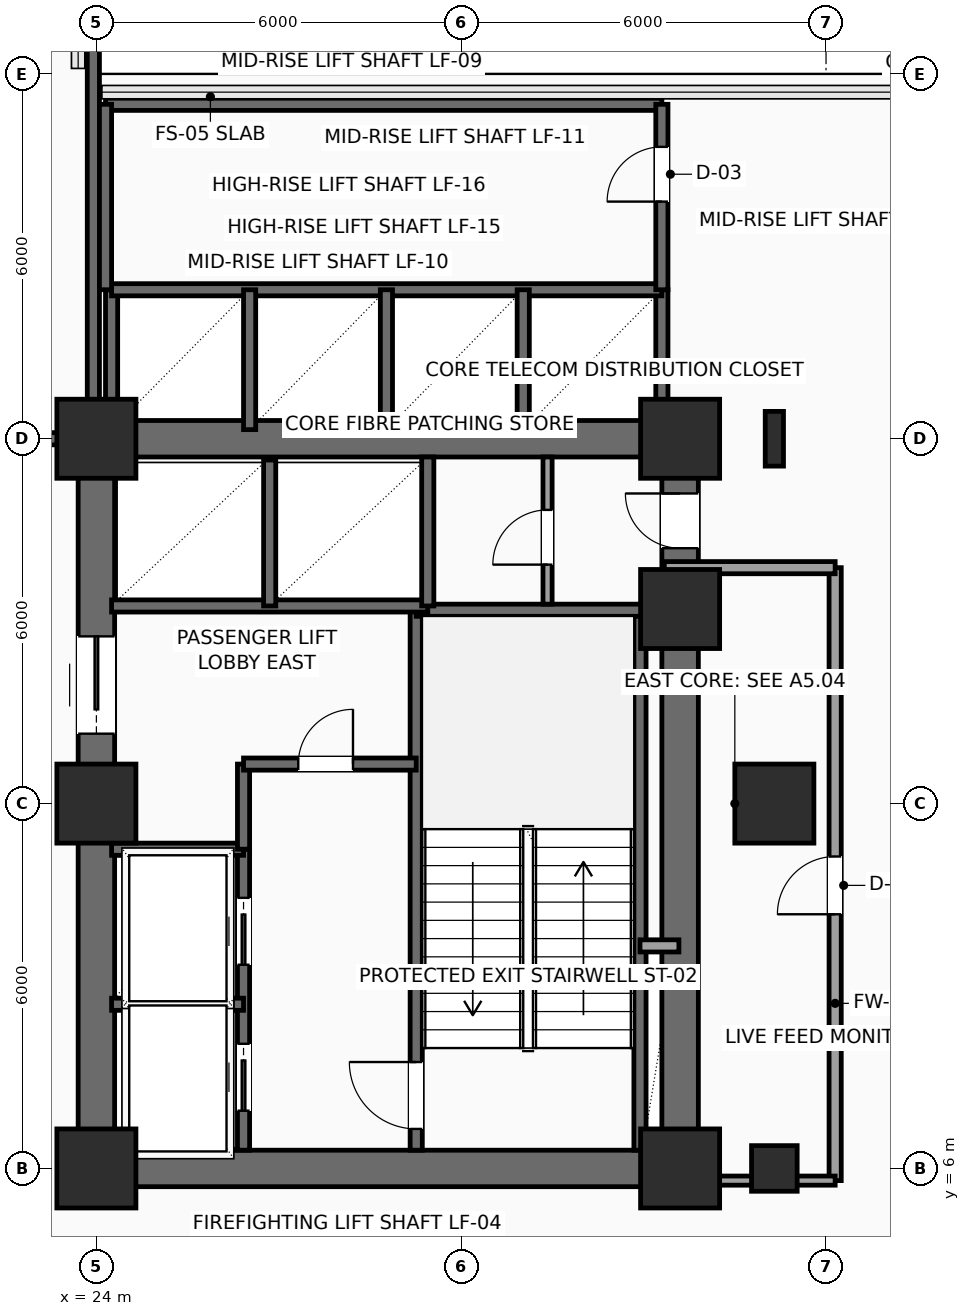
"""IFC4 building model, lengths in metres.
Left out: names, types, materials, properties, quantities, classifications, styles, units other than length and angle.
Written with IfcOpenShell. Run it as: python <this file> out.ifc"""

import sys

from ifc_helpers import new_model, si_unit, direction, frame, frame_2d, origin, origin_2d, place, context, subcontext, project, spatial, rectangle, hollow_rectangle, i_section, extrude, element, fill, save


model = new_model("IFC4")
c1 = context("Model", 3, precision=1e-05, world=origin(), true_north=direction((0.0, 1.0)))
c2 = subcontext(c1, "Body", "Model", "MODEL_VIEW")
j1 = project(units=[si_unit("LENGTHUNIT", "METRE"), si_unit("PLANEANGLEUNIT", "RADIAN")], contexts=[c1])
p1 = place(None, origin())
s1 = spatial("IfcSite", under=j1, at=p1, CompositionType="ELEMENT")
p2 = place(p1, origin())
s2 = spatial("IfcBuilding", under=s1, at=p2, CompositionType="ELEMENT")
p3 = place(p2, frame((0.0, 0.0, 59.7)))
s3 = spatial("IfcBuildingStorey", under=s2, at=p3, CompositionType="ELEMENT", Elevation=59.7)
for number, where, z_axis, x_axis in (
    (1, (24.0, 6.0, 0.0), (0.0, 0.0, 1.0), (1.0, 0.0, 0.0)),
    (2, (24.0, 12.0, 0.0), (0.0, 0.0, 1.0), (1.0, 0.0, 0.0)),
    (3, (24.0, 18.0, 0.0), (0.0, 0.0, 1.0), (1.0, 0.0, 0.0)),
    (4, (33.6, 6.0, 0.0), (0.0, 0.0, 1.0), (1.0, 0.0, 0.0)),
    (5, (33.6, 15.2, 0.0), (0.0, 0.0, 1.0), (1.0, 0.0, 0.0)),
    (6, (33.6, 18.0, 0.0), (0.0, 0.0, 1.0), (1.0, 0.0, 0.0)),
):
    element("IfcColumn", number, at=place(p3, frame(where, z_axis=z_axis, x_axis=x_axis)), inside=s3, PredefinedType="COLUMN", context=c2, shape_type="SweptSolid", body=[
        extrude(rectangle(XDim=1.3, YDim=1.3, at=origin_2d()), origin(), (0.0, 0.0, 1.0), 3.9),
    ])
p4 = place(p3, frame((35.15, 6.0, 0.0), z_axis=(0.0, 0.0, 1.0), x_axis=(1.0, 0.0, 0.0)))
e7 = element("IfcColumn", 7, at=p4, inside=s3, PredefinedType="COLUMN", context=c2, shape_type="SweptSolid", body=[
    extrude(hollow_rectangle(XDim=0.75, YDim=0.75, WallThickness=0.035, InnerFilletRadius=0.035, OuterFilletRadius=0.05, at=origin_2d()), origin(), (0.0, 0.0, 1.0), 3.9),
])
p5 = place(p3, frame((35.15, 12.0, 0.0), z_axis=(0.0, 0.0, 1.0), x_axis=(1.0, 0.0, 0.0)))
e8 = element("IfcColumn", 8, at=p5, inside=s3, PredefinedType="COLUMN", context=c2, shape_type="SweptSolid", body=[
    extrude(rectangle(XDim=1.3, YDim=1.3, at=origin_2d()), origin(), (0.0, 0.0, 1.0), 3.9),
])
p6 = place(p3, frame((35.15, 18.0, 0.0), z_axis=(0.0, 0.0, 1.0), x_axis=(1.0, 0.0, 0.0)))
e9 = element("IfcColumn", 9, at=p6, inside=s3, PredefinedType="COLUMN", context=c2, shape_type="SweptSolid", body=[
    extrude(i_section(OverallWidth=0.3, OverallDepth=0.9, WebThickness=0.019, FlangeThickness=0.035, FilletRadius=0.03, at=origin_2d()), origin(), (0.0, 0.0, 1.0), 3.9),
])
for number, where, z_axis, x_axis in (
    (10, (24.0, 6.0, 0.0), (0.0, 0.0, 1.0), (1.0, 0.0, 0.0)),
    (11, (24.0, 18.0, 0.0), (0.0, 0.0, 1.0), (1.0, 0.0, 0.0)),
):
    element("IfcWall", number, at=place(p3, frame(where, z_axis=z_axis, x_axis=x_axis)), inside=s3, PredefinedType="SHEAR", context=c2, shape_type="SweptSolid", body=[
        extrude(rectangle(XDim=9.6, YDim=0.6, at=frame_2d((4.8, 0.0))), origin(), (0.0, 0.0, 1.0), 3.65),
    ])
p7 = place(p3, frame((24.0, 6.0, 0.0), z_axis=(0.0, 0.0, 1.0), x_axis=(0.0, 1.0, 0.0)))
e12 = element("IfcWall", 12, at=p7, inside=s3, PredefinedType="SHEAR", context=c2, shape_type="SweptSolid", body=[
    extrude(rectangle(XDim=12.0, YDim=0.6, at=frame_2d((6.0, 0.0))), origin(), (0.0, 0.0, 1.0), 3.65),
])
p8 = place(p7, frame((7.15, 0.0, 0.0)))
e13 = element("IfcOpeningElement", 13, at=p8, cuts=e12, PredefinedType="OPENING", context=c2, shape_type="SweptSolid", body=[
    extrude(rectangle(XDim=1.6, YDim=2.3, at=frame_2d((0.8, 1.15))), frame((0.0, 0.31, 0.0), z_axis=(0.0, -1.0, 0.0), x_axis=(1.0, 0.0, 0.0)), (0.0, 0.0, 1.0), 0.62),
])
p9 = place(p3, frame((33.6, 6.0, 0.0), z_axis=(0.0, 0.0, 1.0), x_axis=(0.0, 1.0, 0.0)))
e14 = element("IfcWall", 14, at=p9, inside=s3, PredefinedType="SHEAR", context=c2, shape_type="SweptSolid", body=[
    extrude(rectangle(XDim=12.0, YDim=0.6, at=frame_2d((6.0, 0.0))), origin(), (0.0, 0.0, 1.0), 3.65),
])
p10 = place(p9, frame((10.2, 0.0, 0.0)))
e15 = element("IfcOpeningElement", 15, at=p10, cuts=e14, PredefinedType="OPENING", context=c2, shape_type="SweptSolid", body=[
    extrude(rectangle(XDim=0.9, YDim=2.15, at=frame_2d((0.45, 1.075))), frame((0.0, 0.31, 0.0), z_axis=(0.0, -1.0, 0.0), x_axis=(1.0, 0.0, 0.0)), (0.0, 0.0, 1.0), 0.62),
])
p11 = place(p3, frame((29.26, 6.3, 0.0), z_axis=(0.0, 0.0, 1.0), x_axis=(0.0, 1.0, 0.0)))
e16 = element("IfcWall", 16, at=p11, inside=s3, PredefinedType="SHEAR", context=c2, shape_type="SweptSolid", body=[
    extrude(rectangle(XDim=8.88, YDim=0.2, at=frame_2d((4.44, 0.0))), origin(), (0.0, 0.0, 1.0), 3.65),
])
p12 = place(p11, frame((0.35, 0.0, 0.0)))
e17 = element("IfcOpeningElement", 17, at=p12, cuts=e16, PredefinedType="OPENING", context=c2, shape_type="SweptSolid", body=[
    extrude(rectangle(XDim=1.1, YDim=2.2, at=frame_2d((0.55, 1.1))), frame((0.0, 0.11, 0.0), z_axis=(0.0, -1.0, 0.0), x_axis=(1.0, 0.0, 0.0)), (0.0, 0.0, 1.0), 0.22),
])
p13 = place(p3, frame((32.94, 6.3, 0.0), z_axis=(0.0, 0.0, 1.0), x_axis=(0.0, 1.0, 0.0)))
e18 = element("IfcWall", 18, at=p13, inside=s3, PredefinedType="SHEAR", context=c2, shape_type="SweptSolid", body=[
    extrude(rectangle(XDim=8.88, YDim=0.2, at=frame_2d((4.44, 0.0))), origin(), (0.0, 0.0, 1.0), 3.65),
])
p14 = place(p3, frame((29.26, 15.18, 0.0), z_axis=(0.0, 0.0, 1.0), x_axis=(1.0, 0.0, 0.0)))
e19 = element("IfcWall", 19, at=p14, inside=s3, PredefinedType="SHEAR", context=c2, shape_type="SweptSolid", body=[
    extrude(rectangle(XDim=4.04, YDim=0.2, at=frame_2d((2.02, 0.0))), origin(), (0.0, 0.0, 1.0), 3.65),
])
p15 = place(p3, frame((26.42, 6.3, 0.0), z_axis=(0.0, 0.0, 1.0), x_axis=(0.0, 1.0, 0.0)))
e20 = element("IfcWall", 20, at=p15, inside=s3, PredefinedType="SHEAR", context=c2, shape_type="SweptSolid", body=[
    extrude(rectangle(XDim=4.95, YDim=0.2, at=frame_2d((2.475, 0.0))), origin(), (0.0, 0.0, 1.0), 3.65),
])
p16 = place(p15, frame((0.65, 0.0, 0.0)))
e21 = element("IfcOpeningElement", 21, at=p16, cuts=e20, PredefinedType="OPENING", context=c2, shape_type="SweptSolid", body=[
    extrude(rectangle(XDim=1.1, YDim=2.2, at=frame_2d((0.55, 1.1))), frame((0.0, 0.11, 0.0), z_axis=(0.0, -1.0, 0.0), x_axis=(1.0, 0.0, 0.0)), (0.0, 0.0, 1.0), 0.22),
])
p17 = place(p15, frame((3.05, 0.0, 0.0)))
e22 = element("IfcOpeningElement", 22, at=p17, cuts=e20, PredefinedType="OPENING", context=c2, shape_type="SweptSolid", body=[
    extrude(rectangle(XDim=1.1, YDim=2.2, at=frame_2d((0.55, 1.1))), frame((0.0, 0.11, 0.0), z_axis=(0.0, -1.0, 0.0), x_axis=(1.0, 0.0, 0.0)), (0.0, 0.0, 1.0), 0.22),
])
for number, where, z_axis, x_axis in (
    (23, (24.25, 8.7, 0.0), (0.0, 0.0, 1.0), (1.0, 0.0, 0.0)),
    (24, (24.25, 11.25, 0.0), (0.0, 0.0, 1.0), (1.0, 0.0, 0.0)),
):
    element("IfcWall", number, at=place(p3, frame(where, z_axis=z_axis, x_axis=x_axis)), inside=s3, PredefinedType="SHEAR", context=c2, shape_type="SweptSolid", body=[
        extrude(rectangle(XDim=2.17, YDim=0.2, at=frame_2d((1.085, 0.0))), origin(), (0.0, 0.0, 1.0), 3.65),
    ])
p18 = place(p3, frame((26.42, 11.25, 0.0), z_axis=(0.0, 0.0, 1.0), x_axis=(0.0, 1.0, 0.0)))
e25 = element("IfcWall", 25, at=p18, inside=s3, PredefinedType="SHEAR", context=c2, shape_type="SweptSolid", body=[
    extrude(rectangle(XDim=1.4, YDim=0.2, at=frame_2d((0.7, 0.0))), origin(), (0.0, 0.0, 1.0), 3.65),
])
p19 = place(p3, frame((26.42, 12.65, 0.0), z_axis=(0.0, 0.0, 1.0), x_axis=(1.0, 0.0, 0.0)))
e26 = element("IfcWall", 26, at=p19, inside=s3, PredefinedType="SHEAR", context=c2, shape_type="SweptSolid", body=[
    extrude(rectangle(XDim=2.84, YDim=0.2, at=frame_2d((1.42, 0.0))), origin(), (0.0, 0.0, 1.0), 3.65),
])
p20 = place(p19, frame((0.9, 0.0, 0.0)))
e27 = element("IfcOpeningElement", 27, at=p20, cuts=e26, PredefinedType="OPENING", context=c2, shape_type="SweptSolid", body=[
    extrude(rectangle(XDim=0.9, YDim=2.15, at=frame_2d((0.45, 1.075))), frame((0.0, 0.11, 0.0), z_axis=(0.0, -1.0, 0.0), x_axis=(1.0, 0.0, 0.0)), (0.0, 0.0, 1.0), 0.22),
])
p21 = place(p3, frame((32.94, 9.66, 0.0), z_axis=(0.0, 0.0, 1.0), x_axis=(1.0, 0.0, 0.0)))
e28 = element("IfcWall", 28, at=p21, inside=s3, PredefinedType="SOLIDWALL", context=c2, shape_type="SweptSolid", body=[
    extrude(rectangle(XDim=0.64, YDim=0.2, at=frame_2d((0.32, 0.0))), origin(), (0.0, 0.0, 1.0), 3.65),
])
p22 = place(p3, frame((24.25, 15.25, 0.0), z_axis=(0.0, 0.0, 1.0), x_axis=(1.0, 0.0, 0.0)))
e29 = element("IfcWall", 29, at=p22, inside=s3, PredefinedType="SHEAR", context=c2, shape_type="SweptSolid", body=[
    extrude(rectangle(XDim=5.2, YDim=0.2, at=frame_2d((2.6, 0.0))), origin(), (0.0, 0.0, 1.0), 3.65),
])
p23 = place(p3, frame((26.85, 15.25, 0.0), z_axis=(0.0, 0.0, 1.0), x_axis=(0.0, 1.0, 0.0)))
e30 = element("IfcWall", 30, at=p23, inside=s3, PredefinedType="SHEAR", context=c2, shape_type="SweptSolid", body=[
    extrude(rectangle(XDim=2.4, YDim=0.2, at=frame_2d((1.2, 0.0))), origin(), (0.0, 0.0, 1.0), 3.65),
])
p24 = place(p3, frame((29.45, 15.25, 0.0), z_axis=(0.0, 0.0, 1.0), x_axis=(0.0, 1.0, 0.0)))
e31 = element("IfcWall", 31, at=p24, inside=s3, PredefinedType="SHEAR", context=c2, shape_type="SweptSolid", body=[
    extrude(rectangle(XDim=2.45, YDim=0.2, at=frame_2d((1.225, 0.0))), origin(), (0.0, 0.0, 1.0), 3.65),
])
p25 = place(p3, frame((31.42, 15.28, 0.0), z_axis=(0.0, 0.0, 1.0), x_axis=(0.0, 1.0, 0.0)))
e32 = element("IfcWall", 32, at=p25, inside=s3, PredefinedType="PARTITIONING", context=c2, shape_type="SweptSolid", body=[
    extrude(rectangle(XDim=2.42, YDim=0.15, at=frame_2d((1.21, 0.0))), origin(), (0.0, 0.0, 1.0), 3.65),
])
p26 = place(p25, frame((0.65, 0.0, 0.0)))
e33 = element("IfcOpeningElement", 33, at=p26, cuts=e32, PredefinedType="OPENING", context=c2, shape_type="SweptSolid", body=[
    extrude(rectangle(XDim=0.9, YDim=2.15, at=frame_2d((0.45, 1.075))), frame((0.0, 0.085, 0.0), z_axis=(0.0, -1.0, 0.0), x_axis=(1.0, 0.0, 0.0)), (0.0, 0.0, 1.0), 0.17),
])
p27 = place(p3, frame((20.45, 18.0, 0.0), z_axis=(0.0, 0.0, 1.0), x_axis=(1.0, 0.0, 0.0)))
e34 = element("IfcWall", 34, at=p27, inside=s3, PredefinedType="SHEAR", context=c2, shape_type="SweptSolid", body=[
    extrude(rectangle(XDim=3.5, YDim=0.2, at=frame_2d((1.75, 0.0))), origin(), (0.0, 0.0, 1.0), 3.65),
])
p28 = place(p27, frame((0.95, 0.0, 0.0)))
e35 = element("IfcOpeningElement", 35, at=p28, cuts=e34, PredefinedType="OPENING", context=c2, shape_type="SweptSolid", body=[
    extrude(rectangle(XDim=1.6, YDim=2.3, at=frame_2d((0.8, 1.15))), frame((0.0, 0.11, 0.0), z_axis=(0.0, -1.0, 0.0), x_axis=(1.0, 0.0, 0.0)), (0.0, 0.0, 1.0), 0.22),
])
p29 = place(p3, frame((23.95, 18.0, 0.0), z_axis=(0.0, 0.0, 1.0), x_axis=(0.0, 1.0, 0.0)))
e36 = element("IfcWall", 36, at=p29, inside=s3, PredefinedType="SHEAR", context=c2, shape_type="SweptSolid", body=[
    extrude(rectangle(XDim=9.3, YDim=0.2, at=frame_2d((4.65, 0.0))), origin(), (0.0, 0.0, 1.0), 3.65),
])
for number, where, z_axis, x_axis in (
    (37, (33.3, 18.1, 0.0), (0.0, 0.0, 1.0), (0.0, 1.0, 0.0)),
    (38, (24.25, 18.1, 0.0), (0.0, 0.0, 1.0), (0.0, 1.0, 0.0)),
):
    element("IfcWall", number, at=place(p3, frame(where, z_axis=z_axis, x_axis=x_axis)), inside=s3, PredefinedType="SHEAR", context=c2, shape_type="SweptSolid", body=[
        extrude(rectangle(XDim=2.35, YDim=0.2, at=frame_2d((1.175, 0.0))), origin(), (0.0, 0.0, 1.0), 3.65),
    ])
p30 = place(p3, frame((24.25, 20.45, 0.0), z_axis=(0.0, 0.0, 1.0), x_axis=(1.0, 0.0, 0.0)))
e39 = element("IfcWall", 39, at=p30, inside=s3, PredefinedType="SHEAR", context=c2, shape_type="SweptSolid", body=[
    extrude(rectangle(XDim=9.05, YDim=0.2, at=frame_2d((4.525, 0.0))), origin(), (0.0, 0.0, 1.0), 3.65),
])
for number, where, z_axis, x_axis in (
    (40, (26.52, 18.15, 0.0), (0.0, 0.0, 1.0), (0.0, 1.0, 0.0)),
    (41, (28.77, 18.15, 0.0), (0.0, 0.0, 1.0), (0.0, 1.0, 0.0)),
    (42, (31.02, 18.15, 0.0), (0.0, 0.0, 1.0), (0.0, 1.0, 0.0)),
):
    element("IfcWall", number, at=place(p3, frame(where, z_axis=z_axis, x_axis=x_axis)), inside=s3, PredefinedType="SHEAR", context=c2, shape_type="SweptSolid", body=[
        extrude(rectangle(XDim=2.3, YDim=0.2, at=frame_2d((1.15, 0.0))), origin(), (0.0, 0.0, 1.0), 3.65),
    ])
p31 = place(p3, frame((24.15, 23.5, 0.0), z_axis=(0.0, 0.0, 1.0), x_axis=(1.0, 0.0, 0.0)))
e43 = element("IfcWall", 43, at=p31, inside=s3, PredefinedType="SHEAR", context=c2, shape_type="SweptSolid", body=[
    extrude(rectangle(XDim=9.15, YDim=0.2, at=frame_2d((4.575, 0.0))), origin(), (0.0, 0.0, 1.0), 3.65),
])
p32 = place(p3, frame((33.3, 20.45, 0.0), z_axis=(0.0, 0.0, 1.0), x_axis=(0.0, 1.0, 0.0)))
e44 = element("IfcWall", 44, at=p32, inside=s3, PredefinedType="SHEAR", context=c2, shape_type="SweptSolid", body=[
    extrude(rectangle(XDim=3.05, YDim=0.2, at=frame_2d((1.525, 0.0))), origin(), (0.0, 0.0, 1.0), 3.65),
])
p33 = place(p32, frame((1.45, 0.0, 0.0)))
e45 = element("IfcOpeningElement", 45, at=p33, cuts=e44, PredefinedType="OPENING", context=c2, shape_type="SweptSolid", body=[
    extrude(rectangle(XDim=0.9, YDim=2.15, at=frame_2d((0.45, 1.075))), frame((0.0, 0.11, 0.0), z_axis=(0.0, -1.0, 0.0), x_axis=(1.0, 0.0, 0.0)), (0.0, 0.0, 1.0), 0.22),
])
p34 = place(p3, frame((24.15, 20.45, 0.0), z_axis=(0.0, 0.0, 1.0), x_axis=(0.0, 1.0, 0.0)))
e46 = element("IfcWall", 46, at=p34, inside=s3, PredefinedType="SHEAR", context=c2, shape_type="SweptSolid", body=[
    extrude(rectangle(XDim=3.05, YDim=0.2, at=frame_2d((1.525, 0.0))), origin(), (0.0, 0.0, 1.0), 3.65),
])
p35 = place(p3, frame((36.15, 5.8, 0.0), z_axis=(0.0, 0.0, 1.0), x_axis=(0.0, 1.0, 0.0)))
e47 = element("IfcWall", 47, at=p35, inside=s3, PredefinedType="SOLIDWALL", context=c2, shape_type="SweptSolid", body=[
    extrude(rectangle(XDim=10.08, YDim=0.2, at=frame_2d((5.04, 0.0))), origin(), (0.0, 0.0, 1.0), 3.65),
])
p36 = place(p35, frame((4.38, 0.0, 0.0)))
e48 = element("IfcOpeningElement", 48, at=p36, cuts=e47, PredefinedType="OPENING", context=c2, shape_type="SweptSolid", body=[
    extrude(rectangle(XDim=0.95, YDim=2.15, at=frame_2d((0.475, 1.075))), frame((0.0, 0.11, 0.0), z_axis=(0.0, -1.0, 0.0), x_axis=(1.0, 0.0, 0.0)), (0.0, 0.0, 1.0), 0.22),
])
p37 = place(p3, frame((36.15, 15.88, 0.0), z_axis=(0.0, 0.0, 1.0), x_axis=(-1.0, 0.0, 0.0)))
e49 = element("IfcWall", 49, at=p37, inside=s3, PredefinedType="SOLIDWALL", context=c2, shape_type="SweptSolid", body=[
    extrude(rectangle(XDim=2.81, YDim=0.2, at=frame_2d((1.405, 0.0))), origin(), (0.0, 0.0, 1.0), 3.65),
])
p38 = place(p3, frame((33.65, 5.8, 0.0), z_axis=(0.0, 0.0, 1.0), x_axis=(1.0, 0.0, 0.0)))
e50 = element("IfcWall", 50, at=p38, inside=s3, PredefinedType="PARTITIONING", context=c2, shape_type="SweptSolid", body=[
    extrude(rectangle(XDim=2.5, YDim=0.15, at=frame_2d((1.25, 0.0))), origin(), (0.0, 0.0, 1.0), 2.992),
])
p39 = place(p8, origin())
e51 = element("IfcDoor", 51, at=p39, inside=s3, OperationType="DOUBLE_DOOR_SLIDING", PredefinedType="DOOR", context=c2, shape_type="SweptSolid", body=[
    extrude(rectangle(XDim=1.6, YDim=2.3, at=frame_2d((0.8, 1.15))), frame((0.0, 0.025, 0.0), z_axis=(0.0, -1.0, 0.0), x_axis=(1.0, 0.0, 0.0)), (0.0, 0.0, 1.0), 0.05),
])
fill(e13, e51)
p40 = place(p10, origin())
e52 = element("IfcDoor", 52, at=p40, inside=s3, OperationType="SINGLE_SWING_RIGHT", PredefinedType="DOOR", context=c2, shape_type="SweptSolid", body=[
    extrude(rectangle(XDim=0.9, YDim=2.15, at=frame_2d((0.45, 1.075))), frame((0.0, 0.025, 0.0), z_axis=(0.0, -1.0, 0.0), x_axis=(1.0, 0.0, 0.0)), (0.0, 0.0, 1.0), 0.05),
])
fill(e15, e52)
p41 = place(p12, origin())
e53 = element("IfcDoor", 53, at=p41, inside=s3, OperationType="SINGLE_SWING_RIGHT", PredefinedType="DOOR", context=c2, shape_type="SweptSolid", body=[
    extrude(rectangle(XDim=1.1, YDim=2.2, at=frame_2d((0.55, 1.1))), frame((0.0, 0.025, 0.0), z_axis=(0.0, -1.0, 0.0), x_axis=(1.0, 0.0, 0.0)), (0.0, 0.0, 1.0), 0.05),
])
fill(e17, e53)
p42 = place(p16, origin())
e54 = element("IfcDoor", 54, at=p42, inside=s3, OperationType="SLIDING_TO_LEFT", PredefinedType="DOOR", context=c2, shape_type="SweptSolid", body=[
    extrude(rectangle(XDim=1.1, YDim=2.2, at=frame_2d((0.55, 1.1))), frame((0.0, 0.025, 0.0), z_axis=(0.0, -1.0, 0.0), x_axis=(1.0, 0.0, 0.0)), (0.0, 0.0, 1.0), 0.05),
])
fill(e21, e54)
p43 = place(p17, origin())
e55 = element("IfcDoor", 55, at=p43, inside=s3, OperationType="SLIDING_TO_LEFT", PredefinedType="DOOR", context=c2, shape_type="SweptSolid", body=[
    extrude(rectangle(XDim=1.1, YDim=2.2, at=frame_2d((0.55, 1.1))), frame((0.0, 0.025, 0.0), z_axis=(0.0, -1.0, 0.0), x_axis=(1.0, 0.0, 0.0)), (0.0, 0.0, 1.0), 0.05),
])
fill(e22, e55)
p44 = place(p20, origin())
e56 = element("IfcDoor", 56, at=p44, inside=s3, OperationType="SINGLE_SWING_RIGHT", PredefinedType="DOOR", context=c2, shape_type="SweptSolid", body=[
    extrude(rectangle(XDim=0.9, YDim=2.15, at=frame_2d((0.45, 1.075))), frame((0.0, 0.025, 0.0), z_axis=(0.0, -1.0, 0.0), x_axis=(1.0, 0.0, 0.0)), (0.0, 0.0, 1.0), 0.05),
])
fill(e27, e56)
p45 = place(p26, origin())
e57 = element("IfcDoor", 57, at=p45, inside=s3, OperationType="SINGLE_SWING_LEFT", PredefinedType="DOOR", context=c2, shape_type="SweptSolid", body=[
    extrude(rectangle(XDim=0.9, YDim=2.15, at=frame_2d((0.45, 1.075))), frame((0.0, 0.025, 0.0), z_axis=(0.0, -1.0, 0.0), x_axis=(1.0, 0.0, 0.0)), (0.0, 0.0, 1.0), 0.05),
])
fill(e33, e57)
p46 = place(p33, origin())
e58 = element("IfcDoor", 58, at=p46, inside=s3, OperationType="SINGLE_SWING_LEFT", PredefinedType="DOOR", context=c2, shape_type="SweptSolid", body=[
    extrude(rectangle(XDim=0.9, YDim=2.15, at=frame_2d((0.45, 1.075))), frame((0.0, 0.025, 0.0), z_axis=(0.0, -1.0, 0.0), x_axis=(1.0, 0.0, 0.0)), (0.0, 0.0, 1.0), 0.05),
])
fill(e45, e58)
p47 = place(p36, origin())
e59 = element("IfcDoor", 59, at=p47, inside=s3, OperationType="SINGLE_SWING_LEFT", PredefinedType="DOOR", context=c2, shape_type="SweptSolid", body=[
    extrude(rectangle(XDim=0.95, YDim=2.15, at=frame_2d((0.475, 1.075))), frame((0.0, 0.025, 0.0), z_axis=(0.0, -1.0, 0.0), x_axis=(1.0, 0.0, 0.0)), (0.0, 0.0, 1.0), 0.05),
])
fill(e48, e59)
save(model, sys.argv[1])
